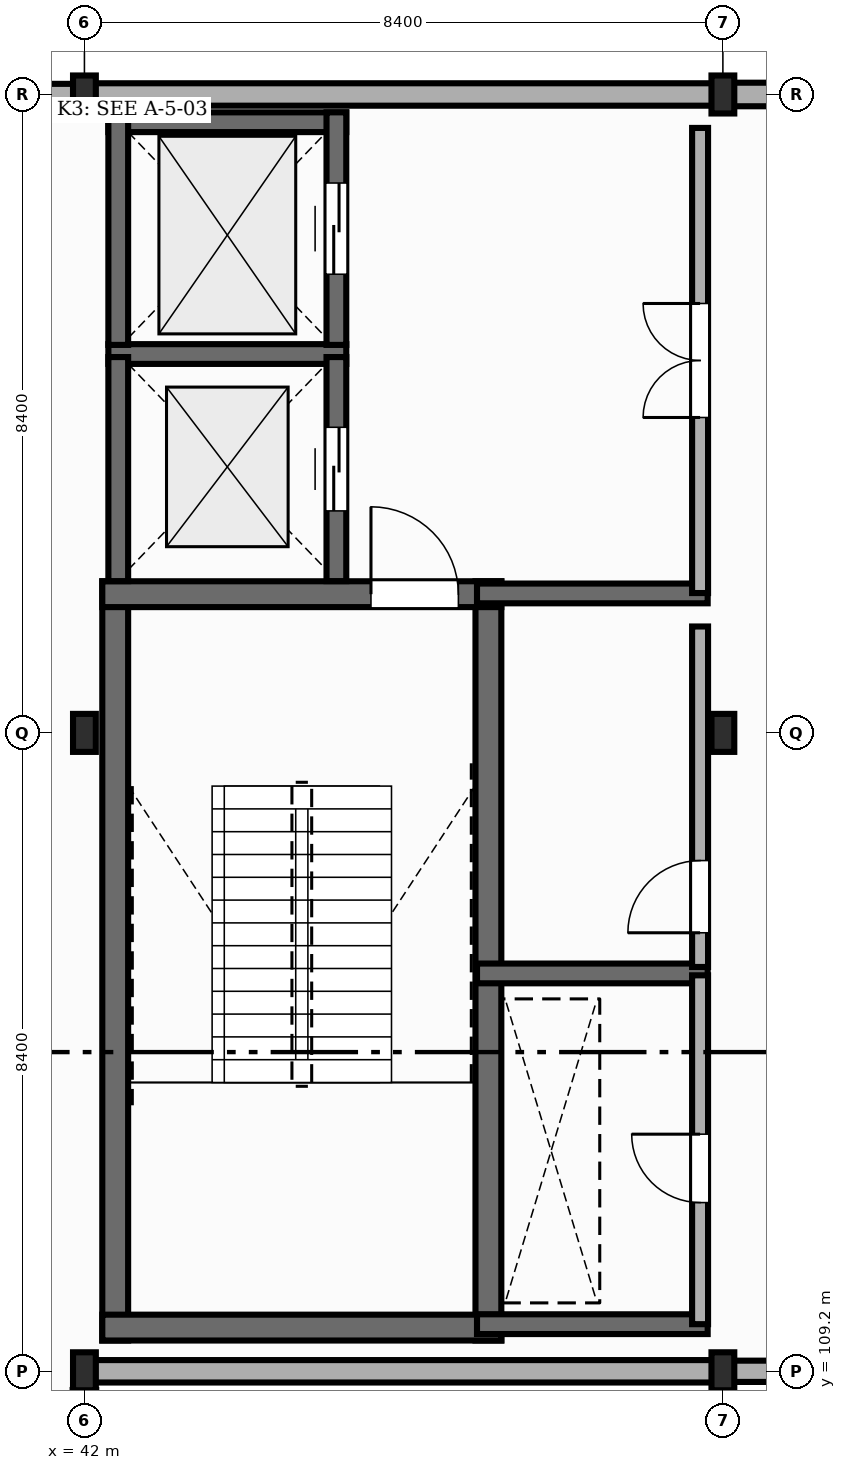
"""IFC4 building model, lengths in metres.
Left out: names, types, materials, properties, quantities, classifications, styles, units other than length and angle.
Written with IfcOpenShell. Run it as: python <this file> out.ifc"""

import sys

from ifc_helpers import new_model, si_unit, direction, frame, frame_2d, origin, origin_2d, place, context, subcontext, project, spatial, rectangle, i_section, extrude, element, fill, save


model = new_model("IFC4")
c1 = context("Model", 3, precision=1e-05, world=origin(), true_north=direction((0.0, 1.0)))
c2 = subcontext(c1, "Body", "Model", "MODEL_VIEW")
j1 = project(units=[si_unit("LENGTHUNIT", "METRE"), si_unit("PLANEANGLEUNIT", "RADIAN")], contexts=[c1])
p1 = place(None, origin())
s1 = spatial("IfcSite", under=j1, at=p1, CompositionType="ELEMENT")
p2 = place(p1, origin())
s2 = spatial("IfcBuilding", under=s1, at=p2, CompositionType="ELEMENT")
p3 = place(p2, frame((0.0, 0.0, 5.4)))
s3 = spatial("IfcBuildingStorey", under=s2, at=p3, CompositionType="ELEMENT", Elevation=5.4)
for number, where, z_axis, x_axis in (
    (1, (42.0, 109.2, 0.0), (0.0, 0.0, 1.0), (1.0, 0.0, 0.0)),
    (2, (42.0, 117.6, 0.0), (0.0, 0.0, 1.0), (1.0, 0.0, 0.0)),
    (3, (42.0, 126.0, 0.0), (0.0, 0.0, 1.0), (1.0, 0.0, 0.0)),
    (4, (50.4, 109.2, 0.0), (0.0, 0.0, 1.0), (1.0, 0.0, 0.0)),
    (5, (50.4, 117.6, 0.0), (0.0, 0.0, 1.0), (1.0, 0.0, 0.0)),
    (6, (50.4, 126.0, 0.0), (0.0, 0.0, 1.0), (1.0, 0.0, 0.0)),
):
    element("IfcColumn", number, at=place(p3, frame(where, z_axis=z_axis, x_axis=x_axis)), inside=s3, PredefinedType="COLUMN", context=c2, shape_type="SweptSolid", body=[
        extrude(i_section(OverallWidth=0.3, OverallDepth=0.5, WebThickness=0.014, FlangeThickness=0.028, FilletRadius=0.027, at=origin_2d()), origin(), (0.0, 0.0, 1.0), 4.5),
    ])
p4 = place(p3, frame((58.792, 126.0, 0.0), z_axis=(0.0, 0.0, 1.0), x_axis=(-1.0, 0.0, 0.0)))
e7 = element("IfcWall", 7, at=p4, inside=s3, PredefinedType="STANDARD", context=c2, shape_type="SweptSolid", body=[
    extrude(rectangle(XDim=8.384, YDim=0.31, at=frame_2d((4.192, 0.0))), origin(), (0.0, 0.0, 1.0), 3.952),
])
p5 = place(p3, frame((50.392, 126.0, 0.0), z_axis=(0.0, 0.0, 1.0), x_axis=(-1.0, 0.0, 0.0)))
e8 = element("IfcWall", 8, at=p5, inside=s3, PredefinedType="STANDARD", context=c2, shape_type="SweptSolid", body=[
    extrude(rectangle(XDim=8.384, YDim=0.295, at=frame_2d((4.192, 0.0))), origin(), (0.0, 0.0, 1.0), 3.922),
])
p6 = place(p3, frame((41.992, 126.0, 0.0), z_axis=(0.0, 0.0, 1.0), x_axis=(-1.0, 0.0, 0.0)))
e9 = element("IfcWall", 9, at=p6, inside=s3, PredefinedType="STANDARD", context=c2, shape_type="SweptSolid", body=[
    extrude(rectangle(XDim=8.384, YDim=0.28, at=frame_2d((4.192, 0.0))), origin(), (0.0, 0.0, 1.0), 3.952),
])
p7 = place(p3, frame((42.0, 101.021, 0.0), z_axis=(0.0, 0.0, 1.0), x_axis=(0.0, 1.0, 0.0)))
e10 = element("IfcWall", 10, at=p7, inside=s3, PredefinedType="STANDARD", context=c2, shape_type="SweptSolid", body=[
    extrude(rectangle(XDim=7.933, YDim=0.31, at=frame_2d((3.967, 0.0))), origin(), (0.0, 0.0, 1.0), 4.012),
])
p8 = place(p3, frame((42.008, 109.2, 0.0), z_axis=(0.0, 0.0, 1.0), x_axis=(1.0, 0.0, 0.0)))
e11 = element("IfcWall", 11, at=p8, inside=s3, PredefinedType="STANDARD", context=c2, shape_type="SweptSolid", body=[
    extrude(rectangle(XDim=8.384, YDim=0.295, at=frame_2d((4.192, 0.0))), origin(), (0.0, 0.0, 1.0), 3.922),
])
p9 = place(p3, frame((50.408, 109.2, 0.0), z_axis=(0.0, 0.0, 1.0), x_axis=(1.0, 0.0, 0.0)))
e12 = element("IfcWall", 12, at=p9, inside=s3, PredefinedType="STANDARD", context=c2, shape_type="SweptSolid", body=[
    extrude(rectangle(XDim=8.384, YDim=0.28, at=frame_2d((4.192, 0.0))), origin(), (0.0, 0.0, 1.0), 3.952),
])
for number, where, z_axis, x_axis in (
    (13, (42.405, 109.605, 0.0), (0.0, 0.0, 1.0), (0.0, 1.0, 0.0)),
    (14, (47.315, 109.605, 0.0), (0.0, 0.0, 1.0), (0.0, 1.0, 0.0)),
):
    element("IfcWall", number, at=place(p3, frame(where, z_axis=z_axis, x_axis=x_axis)), inside=s3, PredefinedType="SHEAR", context=c2, shape_type="SweptSolid", body=[
        extrude(rectangle(XDim=9.99, YDim=0.34, at=frame_2d((4.995, 0.0))), origin(), (0.0, 0.0, 1.0), 4.29),
    ])
p10 = place(p3, frame((42.235, 109.775, 0.0), z_axis=(0.0, 0.0, 1.0), x_axis=(1.0, 0.0, 0.0)))
e15 = element("IfcWall", 15, at=p10, inside=s3, PredefinedType="SHEAR", context=c2, shape_type="SweptSolid", body=[
    extrude(rectangle(XDim=5.25, YDim=0.34, at=frame_2d((2.625, 0.0))), origin(), (0.0, 0.0, 1.0), 4.29),
])
p11 = place(p3, frame((42.235, 119.425, 0.0), z_axis=(0.0, 0.0, 1.0), x_axis=(1.0, 0.0, 0.0)))
e16 = element("IfcWall", 16, at=p11, inside=s3, PredefinedType="SHEAR", context=c2, shape_type="SweptSolid", body=[
    extrude(rectangle(XDim=5.25, YDim=0.34, at=frame_2d((2.625, 0.0))), origin(), (0.0, 0.0, 1.0), 4.29),
])
p12 = place(p11, frame((3.535, 0.0, 0.0)))
e17 = element("IfcOpeningElement", 17, at=p12, cuts=e16, PredefinedType="OPENING", context=c2, shape_type="SweptSolid", body=[
    extrude(rectangle(XDim=1.15, YDim=2.15, at=frame_2d((0.575, 1.075))), frame((0.0, 0.18, 0.0), z_axis=(0.0, -1.0, 0.0), x_axis=(1.0, 0.0, 0.0)), (0.0, 0.0, 1.0), 0.36),
])
p13 = place(p3, frame((42.315, 122.585, 0.0), z_axis=(0.0, 0.0, 1.0), x_axis=(1.0, 0.0, 0.0)))
e18 = element("IfcWall", 18, at=p13, inside=s3, PredefinedType="SHEAR", context=c2, shape_type="SweptSolid", body=[
    extrude(rectangle(XDim=3.13, YDim=0.26, at=frame_2d((1.565, 0.0))), origin(), (0.0, 0.0, 1.0), 4.29),
])
p14 = place(p3, frame((42.445, 119.597, 0.0), z_axis=(0.0, 0.0, 1.0), x_axis=(0.0, 1.0, 0.0)))
e19 = element("IfcWall", 19, at=p14, inside=s3, PredefinedType="SHEAR", context=c2, shape_type="SweptSolid", body=[
    extrude(rectangle(XDim=2.948, YDim=0.26, at=frame_2d((1.474, 0.0))), origin(), (0.0, 0.0, 1.0), 4.29),
])
p15 = place(p3, frame((45.315, 119.597, 0.0), z_axis=(0.0, 0.0, 1.0), x_axis=(0.0, 1.0, 0.0)))
e20 = element("IfcWall", 20, at=p15, inside=s3, PredefinedType="SHEAR", context=c2, shape_type="SweptSolid", body=[
    extrude(rectangle(XDim=2.948, YDim=0.26, at=frame_2d((1.474, 0.0))), origin(), (0.0, 0.0, 1.0), 4.29),
])
p16 = place(p15, frame((0.924, 0.0, 0.0)))
e21 = element("IfcOpeningElement", 21, at=p16, cuts=e20, PredefinedType="OPENING", context=c2, shape_type="SweptSolid", body=[
    extrude(rectangle(XDim=1.1, YDim=2.15, at=frame_2d((0.55, 1.075))), frame((0.0, 0.14, 0.0), z_axis=(0.0, -1.0, 0.0), x_axis=(1.0, 0.0, 0.0)), (0.0, 0.0, 1.0), 0.28),
])
p17 = place(p3, frame((42.315, 125.635, 0.0), z_axis=(0.0, 0.0, 1.0), x_axis=(1.0, 0.0, 0.0)))
e22 = element("IfcWall", 22, at=p17, inside=s3, PredefinedType="SHEAR", context=c2, shape_type="SweptSolid", body=[
    extrude(rectangle(XDim=3.13, YDim=0.26, at=frame_2d((1.565, 0.0))), origin(), (0.0, 0.0, 1.0), 4.29),
])
p18 = place(p3, frame((42.445, 122.705, 0.0), z_axis=(0.0, 0.0, 1.0), x_axis=(0.0, 1.0, 0.0)))
e23 = element("IfcWall", 23, at=p18, inside=s3, PredefinedType="SHEAR", context=c2, shape_type="SweptSolid", body=[
    extrude(rectangle(XDim=3.06, YDim=0.26, at=frame_2d((1.53, 0.0))), origin(), (0.0, 0.0, 1.0), 4.29),
])
p19 = place(p3, frame((45.315, 122.705, 0.0), z_axis=(0.0, 0.0, 1.0), x_axis=(0.0, 1.0, 0.0)))
e24 = element("IfcWall", 24, at=p19, inside=s3, PredefinedType="SHEAR", context=c2, shape_type="SweptSolid", body=[
    extrude(rectangle(XDim=3.06, YDim=0.26, at=frame_2d((1.53, 0.0))), origin(), (0.0, 0.0, 1.0), 4.29),
])
p20 = place(p19, frame((0.93, 0.0, 0.0)))
e25 = element("IfcOpeningElement", 25, at=p20, cuts=e24, PredefinedType="OPENING", context=c2, shape_type="SweptSolid", body=[
    extrude(rectangle(XDim=1.2, YDim=2.15, at=frame_2d((0.6, 1.075))), frame((0.0, 0.14, 0.0), z_axis=(0.0, -1.0, 0.0), x_axis=(1.0, 0.0, 0.0)), (0.0, 0.0, 1.0), 0.28),
])
for number, where, z_axis, x_axis in (
    (26, (47.165, 109.82, 0.0), (0.0, 0.0, 1.0), (1.0, 0.0, 0.0)),
    (27, (47.165, 114.435, 0.0), (0.0, 0.0, 1.0), (1.0, 0.0, 0.0)),
    (28, (47.165, 119.435, 0.0), (0.0, 0.0, 1.0), (1.0, 0.0, 0.0)),
):
    element("IfcWall", number, at=place(p3, frame(where, z_axis=z_axis, x_axis=x_axis)), inside=s3, PredefinedType="SHEAR", context=c2, shape_type="SweptSolid", body=[
        extrude(rectangle(XDim=3.035, YDim=0.26, at=frame_2d((1.518, 0.0))), origin(), (0.0, 0.0, 1.0), 4.29),
    ])
p21 = place(p3, frame((50.1, 109.82, 0.0), z_axis=(0.0, 0.0, 1.0), x_axis=(0.0, 1.0, 0.0)))
e29 = element("IfcWall", 29, at=p21, inside=s3, PredefinedType="STANDARD", context=c2, shape_type="SweptSolid", body=[
    extrude(rectangle(XDim=4.59, YDim=0.21, at=frame_2d((2.295, 0.0))), origin(), (0.0, 0.0, 1.0), 3.882),
])
p22 = place(p21, frame((1.6, 0.0, 0.0)))
e30 = element("IfcOpeningElement", 30, at=p22, cuts=e29, PredefinedType="OPENING", context=c2, shape_type="SweptSolid", body=[
    extrude(rectangle(XDim=0.9, YDim=2.1, at=frame_2d((0.45, 1.05))), frame((0.0, 0.115, 0.0), z_axis=(0.0, -1.0, 0.0), x_axis=(1.0, 0.0, 0.0)), (0.0, 0.0, 1.0), 0.23),
])
p23 = place(p3, frame((50.1, 114.52, 0.0), z_axis=(0.0, 0.0, 1.0), x_axis=(0.0, 1.0, 0.0)))
e31 = element("IfcWall", 31, at=p23, inside=s3, PredefinedType="STANDARD", context=c2, shape_type="SweptSolid", body=[
    extrude(rectangle(XDim=4.48, YDim=0.21, at=frame_2d((2.24, 0.0))), origin(), (0.0, 0.0, 1.0), 3.882),
])
p24 = place(p23, frame((0.45, 0.0, 0.0)))
e32 = element("IfcOpeningElement", 32, at=p24, cuts=e31, PredefinedType="OPENING", context=c2, shape_type="SweptSolid", body=[
    extrude(rectangle(XDim=0.95, YDim=2.15, at=frame_2d((0.475, 1.075))), frame((0.0, 0.115, 0.0), z_axis=(0.0, -1.0, 0.0), x_axis=(1.0, 0.0, 0.0)), (0.0, 0.0, 1.0), 0.23),
])
p25 = place(p3, frame((50.1, 119.44, 0.0), z_axis=(0.0, 0.0, 1.0), x_axis=(0.0, 1.0, 0.0)))
e33 = element("IfcWall", 33, at=p25, inside=s3, PredefinedType="STANDARD", context=c2, shape_type="SweptSolid", body=[
    extrude(rectangle(XDim=6.12, YDim=0.21, at=frame_2d((3.06, 0.0))), origin(), (0.0, 0.0, 1.0), 3.932),
])
p26 = place(p25, frame((2.31, 0.0, 0.0)))
e34 = element("IfcOpeningElement", 34, at=p26, cuts=e33, PredefinedType="OPENING", context=c2, shape_type="SweptSolid", body=[
    extrude(rectangle(XDim=1.5, YDim=2.2, at=frame_2d((0.75, 1.1))), frame((0.0, 0.115, 0.0), z_axis=(0.0, -1.0, 0.0), x_axis=(1.0, 0.0, 0.0)), (0.0, 0.0, 1.0), 0.23),
])
p27 = place(p12, origin())
e35 = element("IfcDoor", 35, at=p27, inside=s3, OperationType="SINGLE_SWING_LEFT", PredefinedType="DOOR", context=c2, shape_type="SweptSolid", body=[
    extrude(rectangle(XDim=1.15, YDim=2.15, at=frame_2d((0.575, 1.075))), frame((0.0, 0.025, 0.0), z_axis=(0.0, -1.0, 0.0), x_axis=(1.0, 0.0, 0.0)), (0.0, 0.0, 1.0), 0.05),
])
fill(e17, e35)
p28 = place(p16, origin())
e36 = element("IfcDoor", 36, at=p28, inside=s3, OperationType="DOUBLE_DOOR_SLIDING", PredefinedType="DOOR", context=c2, shape_type="SweptSolid", body=[
    extrude(rectangle(XDim=1.1, YDim=2.15, at=frame_2d((0.55, 1.075))), frame((0.0, 0.025, 0.0), z_axis=(0.0, -1.0, 0.0), x_axis=(1.0, 0.0, 0.0)), (0.0, 0.0, 1.0), 0.05),
])
fill(e21, e36)
p29 = place(p20, origin())
e37 = element("IfcDoor", 37, at=p29, inside=s3, OperationType="DOUBLE_DOOR_SLIDING", PredefinedType="DOOR", context=c2, shape_type="SweptSolid", body=[
    extrude(rectangle(XDim=1.2, YDim=2.15, at=frame_2d((0.6, 1.075))), frame((0.0, 0.025, 0.0), z_axis=(0.0, -1.0, 0.0), x_axis=(1.0, 0.0, 0.0)), (0.0, 0.0, 1.0), 0.05),
])
fill(e25, e37)
p30 = place(p22, origin())
e38 = element("IfcDoor", 38, at=p30, inside=s3, OperationType="SINGLE_SWING_RIGHT", PredefinedType="DOOR", context=c2, shape_type="SweptSolid", body=[
    extrude(rectangle(XDim=0.9, YDim=2.1, at=frame_2d((0.45, 1.05))), frame((0.0, 0.025, 0.0), z_axis=(0.0, -1.0, 0.0), x_axis=(1.0, 0.0, 0.0)), (0.0, 0.0, 1.0), 0.05),
])
fill(e30, e38)
p31 = place(p24, origin())
e39 = element("IfcDoor", 39, at=p31, inside=s3, OperationType="SINGLE_SWING_LEFT", PredefinedType="DOOR", context=c2, shape_type="SweptSolid", body=[
    extrude(rectangle(XDim=0.95, YDim=2.15, at=frame_2d((0.475, 1.075))), frame((0.0, 0.025, 0.0), z_axis=(0.0, -1.0, 0.0), x_axis=(1.0, 0.0, 0.0)), (0.0, 0.0, 1.0), 0.05),
])
fill(e32, e39)
p32 = place(p26, origin())
e40 = element("IfcDoor", 40, at=p32, inside=s3, OperationType="DOUBLE_DOOR_SINGLE_SWING", PredefinedType="DOOR", context=c2, shape_type="SweptSolid", body=[
    extrude(rectangle(XDim=1.5, YDim=2.2, at=frame_2d((0.75, 1.1))), frame((0.0, 0.025, 0.0), z_axis=(0.0, -1.0, 0.0), x_axis=(1.0, 0.0, 0.0)), (0.0, 0.0, 1.0), 0.05),
])
fill(e34, e40)
save(model, sys.argv[1])
